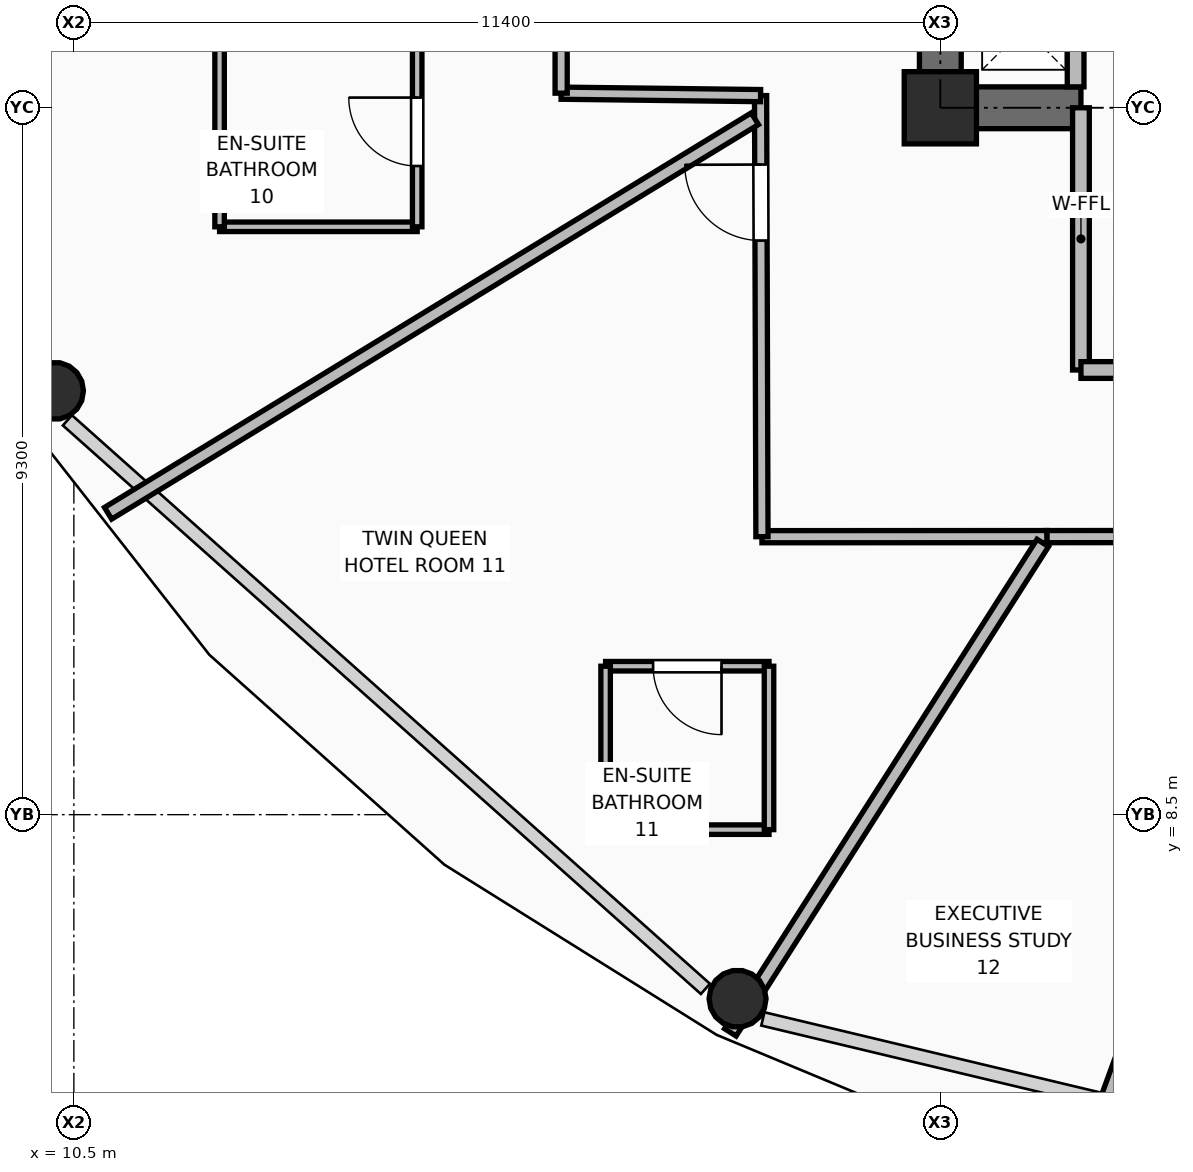
"""IFC4 building model, lengths in metres.
Left out: names, types, materials, properties, quantities, classifications, styles, units other than length and angle.
Written with IfcOpenShell. Run it as: python <this file> out.ifc"""

import sys

from ifc_helpers import new_model, si_unit, direction, frame, frame_2d, origin, origin_2d, place, context, subcontext, project, spatial, rectangle, hollow_circle, extrude, element, fill, save


model = new_model("IFC4")
c1 = context("Model", 3, precision=1e-05, world=origin(), true_north=direction((0.0, 1.0)))
c2 = subcontext(c1, "Body", "Model", "MODEL_VIEW")
j1 = project(units=[si_unit("LENGTHUNIT", "METRE"), si_unit("PLANEANGLEUNIT", "RADIAN")], contexts=[c1])
p1 = place(None, origin())
s1 = spatial("IfcSite", under=j1, at=p1, CompositionType="ELEMENT")
p2 = place(p1, origin())
s2 = spatial("IfcBuilding", under=s1, at=p2, CompositionType="ELEMENT")
p3 = place(p2, frame((0.0, 0.0, 172.2)))
s3 = spatial("IfcBuildingStorey", under=s2, at=p3, CompositionType="ELEMENT", Elevation=172.2)
p4 = place(p3, frame((21.9, 17.8, 0.0), z_axis=(0.0, 0.0, 1.0), x_axis=(1.0, 0.0, 0.0)))
e1 = element("IfcColumn", 1, at=p4, inside=s3, PredefinedType="COLUMN", context=c2, shape_type="SweptSolid", body=[
    extrude(rectangle(XDim=0.95, YDim=0.95, at=origin_2d()), origin(), (0.0, 0.0, 1.0), 3.75),
])
p5 = place(p3, frame((10.251, 14.076, 0.0), z_axis=(0.045976334235, 0.023684778242, 0.998661708473), x_axis=(-0.457956589674, 0.888974556427, 0.0)))
e2 = element("IfcColumn", 2, at=p5, inside=s3, PredefinedType="COLUMN", context=c2, shape_type="SweptSolid", body=[
    extrude(hollow_circle(Radius=0.375, WallThickness=0.035, at=origin_2d()), origin(), (0.0, 0.0, 1.0), 3.505),
])
p6 = place(p3, frame((19.232, 6.079, 0.0), z_axis=(0.0265446917, 0.041036281919, 0.998804987427), x_axis=(-0.839646641546, 0.543133056756, 0.0)))
e3 = element("IfcColumn", 3, at=p6, inside=s3, PredefinedType="COLUMN", context=c2, shape_type="SweptSolid", body=[
    extrude(hollow_circle(Radius=0.375, WallThickness=0.035, at=origin_2d()), origin(), (0.0, 0.0, 1.0), 3.504),
])
p7 = place(p3, frame((21.625, 17.8, 0.0), z_axis=(0.0, 0.0, 1.0), x_axis=(1.0, 0.0, 0.0)))
e4 = element("IfcWall", 4, at=p7, inside=s3, PredefinedType="SHEAR", context=c2, shape_type="SweptSolid", body=[
    extrude(rectangle(XDim=2.125, YDim=0.55, at=frame_2d((1.062, 0.0))), origin(), (0.0, 0.0, 1.0), 3.5),
])
p8 = place(p3, frame((21.9, 18.075, 0.0), z_axis=(0.0, 0.0, 1.0), x_axis=(0.0, 1.0, 0.0)))
e5 = element("IfcWall", 5, at=p8, inside=s3, PredefinedType="SHEAR", context=c2, shape_type="SweptSolid", body=[
    extrude(rectangle(XDim=14.1, YDim=0.55, at=frame_2d((7.05, 0.0))), origin(), (0.0, 0.0, 1.0), 3.5),
])
p9 = place(p3, frame((23.68, 18.075, 0.0), z_axis=(0.0, 0.0, 1.0), x_axis=(0.0, 1.0, 0.0)))
e6 = element("IfcWall", 6, at=p9, inside=s3, PredefinedType="PARTITIONING", context=c2, shape_type="SweptSolid", body=[
    extrude(rectangle(XDim=1.475, YDim=0.22, at=frame_2d((0.738, 0.0))), origin(), (0.0, 0.0, 1.0), 3.48),
])
p10 = place(p3, frame((23.75, 14.35, 0.0), z_axis=(0.0, 0.0, 1.0), x_axis=(0.0, 1.0, 0.0)))
e7 = element("IfcWall", 7, at=p10, inside=s3, PredefinedType="PARTITIONING", context=c2, shape_type="SweptSolid", body=[
    extrude(rectangle(XDim=3.45, YDim=0.22, at=frame_2d((1.725, 0.0))), origin(), (0.0, 0.0, 1.0), 2.936),
])
p11 = place(p3, frame((23.75, 14.35, 0.0), z_axis=(0.0, 0.0, 1.0), x_axis=(1.0, 0.0, 0.0)))
e8 = element("IfcWall", 8, at=p11, inside=s3, PredefinedType="PARTITIONING", context=c2, shape_type="SweptSolid", body=[
    extrude(rectangle(XDim=3.8, YDim=0.22, at=frame_2d((1.9, 0.0))), origin(), (0.0, 0.0, 1.0), 3.48),
])
p12 = place(p3, frame((26.804, 12.16, 0.0), z_axis=(0.0, 0.0, 1.0), x_axis=(-0.999999844558, -0.000557568912, 0.0)))
e9 = element("IfcWall", 9, at=p12, inside=s3, PredefinedType="PARTITIONING", context=c2, shape_type="SweptSolid", body=[
    extrude(rectangle(XDim=3.503, YDim=0.16, at=frame_2d((1.751, 0.0))), origin(), (0.0, 0.0, 1.0), 3.48),
])
p13 = place(p12, frame((1.324, 0.0, 0.0)))
e10 = element("IfcOpeningElement", 10, at=p13, cuts=e9, PredefinedType="OPENING", context=c2, shape_type="SweptSolid", body=[
    extrude(rectangle(XDim=1.0, YDim=2.1, at=frame_2d((0.5, 1.05))), frame((0.0, 0.09, 0.0), z_axis=(0.0, -1.0, 0.0), x_axis=(1.0, 0.0, 0.0)), (0.0, 0.0, 1.0), 0.18),
])
p14 = place(p3, frame((23.301, 12.158, 0.0), z_axis=(0.0, 0.0, 1.0), x_axis=(-0.999999966056, -0.000260552362, 0.0)))
e11 = element("IfcWall", 11, at=p14, inside=s3, PredefinedType="PARTITIONING", context=c2, shape_type="SweptSolid", body=[
    extrude(rectangle(XDim=3.748, YDim=0.16, at=frame_2d((1.874, 0.0))), origin(), (0.0, 0.0, 1.0), 2.936),
])
p15 = place(p3, frame((19.553, 12.157, 0.0), z_axis=(0.0, 0.0, 1.0), x_axis=(-0.003113283747, 0.99999515372, 0.0)))
e12 = element("IfcWall", 12, at=p15, inside=s3, PredefinedType="PARTITIONING", context=c2, shape_type="SweptSolid", body=[
    extrude(rectangle(XDim=5.803, YDim=0.16, at=frame_2d((2.901, 0.0))), origin(), (0.0, 0.0, 1.0), 2.936),
])
p16 = place(p15, frame((3.896, 0.0, 0.0)))
e13 = element("IfcOpeningElement", 13, at=p16, cuts=e12, PredefinedType="OPENING", context=c2, shape_type="SweptSolid", body=[
    extrude(rectangle(XDim=1.0, YDim=2.1, at=frame_2d((0.5, 1.05))), frame((0.0, 0.09, 0.0), z_axis=(0.0, -1.0, 0.0), x_axis=(1.0, 0.0, 0.0)), (0.0, 0.0, 1.0), 0.18),
])
p17 = place(p3, frame((19.535, 17.96, 0.0), z_axis=(0.0, 0.0, 1.0), x_axis=(-0.999925730774, 0.012187408888, 0.0)))
e14 = element("IfcWall", 14, at=p17, inside=s3, PredefinedType="PARTITIONING", context=c2, shape_type="SweptSolid", body=[
    extrude(rectangle(XDim=2.624, YDim=0.16, at=frame_2d((1.312, 0.0))), origin(), (0.0, 0.0, 1.0), 3.48),
])
p18 = place(p3, frame((16.911, 17.992, 0.0), z_axis=(0.0, 0.0, 1.0), x_axis=(0.0, 1.0, 0.0)))
e15 = element("IfcWall", 15, at=p18, inside=s3, PredefinedType="PARTITIONING", context=c2, shape_type="SweptSolid", body=[
    extrude(rectangle(XDim=5.154, YDim=0.16, at=frame_2d((2.577, 0.0))), origin(), (0.0, 0.0, 1.0), 2.936),
])
p19 = place(p18, frame((1.323, 0.0, 0.0)))
e16 = element("IfcOpeningElement", 16, at=p19, cuts=e15, PredefinedType="OPENING", context=c2, shape_type="SweptSolid", body=[
    extrude(rectangle(XDim=1.2, YDim=2.1, at=frame_2d((0.6, 1.05))), frame((0.0, 0.09, 0.0), z_axis=(0.0, -1.0, 0.0), x_axis=(1.0, 0.0, 0.0)), (0.0, 0.0, 1.0), 0.18),
])
p20 = place(p3, frame((19.46, 17.656, 0.0), z_axis=(0.0, 0.0, 1.0), x_axis=(-0.853711993856, -0.520745457537, 0.0)))
e17 = element("IfcWall", 17, at=p20, inside=s3, PredefinedType="PARTITIONING", context=c2, shape_type="SweptSolid", body=[
    extrude(rectangle(XDim=9.968, YDim=0.18, at=frame_2d((4.984, 0.0))), origin(), (0.0, 0.0, 1.0), 2.783),
])
p21 = place(p3, frame((23.248, 12.075, 0.0), z_axis=(0.0, 0.0, 1.0), x_axis=(-0.538138353418, -0.84285651957, 0.0)))
e18 = element("IfcWall", 18, at=p21, inside=s3, PredefinedType="PARTITIONING", context=c2, shape_type="SweptSolid", body=[
    extrude(rectangle(XDim=7.639, YDim=0.18, at=frame_2d((3.82, 0.0))), origin(), (0.0, 0.0, 1.0), 2.783),
])
p22 = place(p3, frame((26.773, 12.075, 0.0), z_axis=(0.0, 0.0, 1.0), x_axis=(-0.343462150778, -0.939166519305, 0.0)))
e19 = element("IfcWall", 19, at=p22, inside=s3, PredefinedType="PARTITIONING", context=c2, shape_type="SweptSolid", body=[
    extrude(rectangle(XDim=8.754, YDim=0.18, at=frame_2d((4.377, 0.0))), origin(), (0.0, 0.0, 1.0), 2.783),
])
p23 = place(p3, frame((12.417, 16.234, 0.0), z_axis=(0.0, 0.0, 1.0), x_axis=(1.0, 0.0, 0.0)))
e20 = element("IfcWall", 20, at=p23, inside=s3, PredefinedType="PARTITIONING", context=c2, shape_type="SweptSolid", body=[
    extrude(rectangle(XDim=2.6, YDim=0.125, at=frame_2d((1.3, 0.0))), origin(), (0.0, 0.0, 1.0), 3.48),
])
p24 = place(p3, frame((12.417, 16.234, 0.0), z_axis=(0.0, 0.0, 1.0), x_axis=(0.0, 1.0, 0.0)))
e21 = element("IfcWall", 21, at=p24, inside=s3, PredefinedType="PARTITIONING", context=c2, shape_type="SweptSolid", body=[
    extrude(rectangle(XDim=2.5, YDim=0.125, at=frame_2d((1.25, 0.0))), origin(), (0.0, 0.0, 1.0), 3.48),
])
p25 = place(p3, frame((15.017, 16.234, 0.0), z_axis=(0.0, 0.0, 1.0), x_axis=(0.0, 1.0, 0.0)))
e22 = element("IfcWall", 22, at=p25, inside=s3, PredefinedType="PARTITIONING", context=c2, shape_type="SweptSolid", body=[
    extrude(rectangle(XDim=2.5, YDim=0.125, at=frame_2d((1.25, 0.0))), origin(), (0.0, 0.0, 1.0), 3.48),
])
p26 = place(p25, frame((0.8, 0.0, 0.0)))
e23 = element("IfcOpeningElement", 23, at=p26, cuts=e22, PredefinedType="OPENING", context=c2, shape_type="SweptSolid", body=[
    extrude(rectangle(XDim=0.9, YDim=2.1, at=frame_2d((0.45, 1.05))), frame((0.0, 0.073, 0.0), z_axis=(0.0, -1.0, 0.0), x_axis=(1.0, 0.0, 0.0)), (0.0, 0.0, 1.0), 0.145),
])
p27 = place(p3, frame((17.496, 8.303, 0.0), z_axis=(0.0, 0.0, 1.0), x_axis=(1.0, 0.0, 0.0)))
e24 = element("IfcWall", 24, at=p27, inside=s3, PredefinedType="PARTITIONING", context=c2, shape_type="SweptSolid", body=[
    extrude(rectangle(XDim=2.15, YDim=0.125, at=frame_2d((1.075, 0.0))), origin(), (0.0, 0.0, 1.0), 2.783),
])
p28 = place(p3, frame((17.496, 10.453, 0.0), z_axis=(0.0, 0.0, 1.0), x_axis=(1.0, 0.0, 0.0)))
e25 = element("IfcWall", 25, at=p28, inside=s3, PredefinedType="PARTITIONING", context=c2, shape_type="SweptSolid", body=[
    extrude(rectangle(XDim=2.15, YDim=0.125, at=frame_2d((1.075, 0.0))), origin(), (0.0, 0.0, 1.0), 3.48),
])
p29 = place(p28, frame((0.625, 0.0, 0.0)))
e26 = element("IfcOpeningElement", 26, at=p29, cuts=e25, PredefinedType="OPENING", context=c2, shape_type="SweptSolid", body=[
    extrude(rectangle(XDim=0.9, YDim=2.1, at=frame_2d((0.45, 1.05))), frame((0.0, 0.073, 0.0), z_axis=(0.0, -1.0, 0.0), x_axis=(1.0, 0.0, 0.0)), (0.0, 0.0, 1.0), 0.145),
])
p30 = place(p3, frame((17.496, 8.303, 0.0), z_axis=(0.0, 0.0, 1.0), x_axis=(0.0, 1.0, 0.0)))
e27 = element("IfcWall", 27, at=p30, inside=s3, PredefinedType="PARTITIONING", context=c2, shape_type="SweptSolid", body=[
    extrude(rectangle(XDim=2.15, YDim=0.125, at=frame_2d((1.075, 0.0))), origin(), (0.0, 0.0, 1.0), 2.783),
])
p31 = place(p3, frame((19.646, 8.303, 0.0), z_axis=(0.0, 0.0, 1.0), x_axis=(0.0, 1.0, 0.0)))
e28 = element("IfcWall", 28, at=p31, inside=s3, PredefinedType="PARTITIONING", context=c2, shape_type="SweptSolid", body=[
    extrude(rectangle(XDim=2.15, YDim=0.125, at=frame_2d((1.075, 0.0))), origin(), (0.0, 0.0, 1.0), 2.936),
])
p32 = place(p26, origin())
e29 = element("IfcDoor", 29, at=p32, inside=s3, OperationType="SINGLE_SWING_RIGHT", PredefinedType="DOOR", context=c2, shape_type="SweptSolid", body=[
    extrude(rectangle(XDim=0.9, YDim=2.1, at=frame_2d((0.45, 1.05))), frame((0.0, 0.025, 0.0), z_axis=(0.0, -1.0, 0.0), x_axis=(1.0, 0.0, 0.0)), (0.0, 0.0, 1.0), 0.05),
])
fill(e23, e29)
p33 = place(p29, frame((0.9, 0.0, 0.0), z_axis=(0.0, 0.0, 1.0), x_axis=(-1.0, 0.0, 0.0)))
e30 = element("IfcDoor", 30, at=p33, inside=s3, OperationType="SINGLE_SWING_LEFT", PredefinedType="DOOR", context=c2, shape_type="SweptSolid", body=[
    extrude(rectangle(XDim=0.9, YDim=2.1, at=frame_2d((0.45, 1.05))), frame((0.0, 0.025, 0.0), z_axis=(0.0, -1.0, 0.0), x_axis=(1.0, 0.0, 0.0)), (0.0, 0.0, 1.0), 0.05),
])
fill(e26, e30)
p34 = place(p16, origin())
e31 = element("IfcDoor", 31, at=p34, inside=s3, OperationType="SINGLE_SWING_RIGHT", PredefinedType="DOOR", context=c2, shape_type="SweptSolid", body=[
    extrude(rectangle(XDim=1.0, YDim=2.1, at=frame_2d((0.5, 1.05))), frame((0.0, 0.025, 0.0), z_axis=(0.0, -1.0, 0.0), x_axis=(1.0, 0.0, 0.0)), (0.0, 0.0, 1.0), 0.05),
])
fill(e13, e31)
save(model, sys.argv[1])
